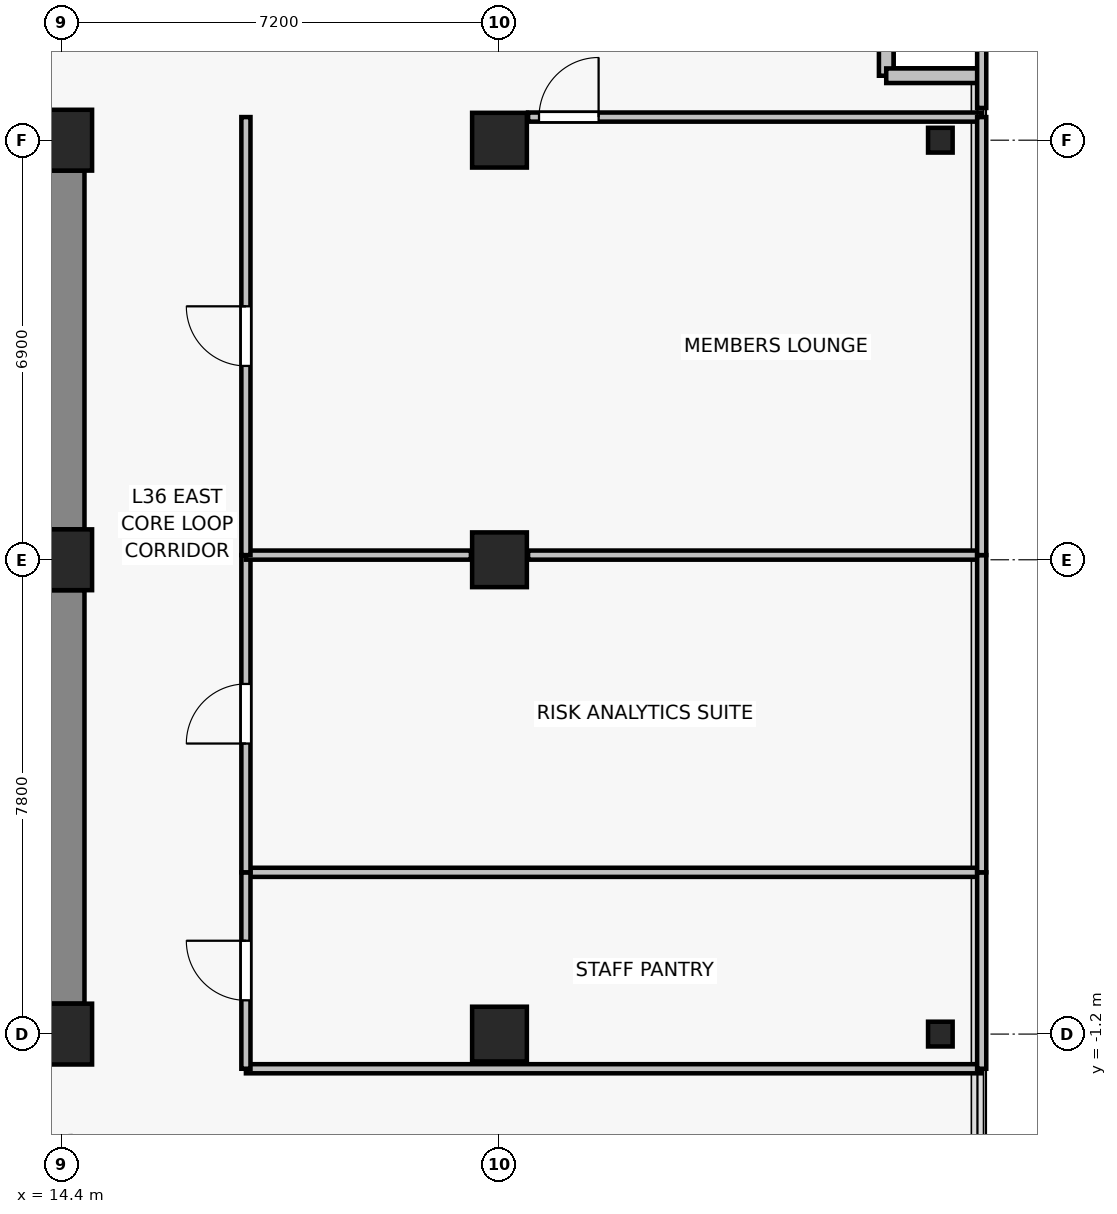
"""IFC4 building model, lengths in metres.
Left out: names, types, materials, properties, quantities, classifications, styles, units other than length and angle.
Written with IfcOpenShell. Run it as: python <this file> out.ifc"""

import sys

from ifc_helpers import new_model, si_unit, direction, frame, frame_2d, origin, origin_2d, place, context, subcontext, project, spatial, rectangle, i_section, extrude, source, transform, mapped, element, fill, save


model = new_model("IFC4")
c1 = context("Model", 3, precision=1e-05, world=origin(), true_north=direction((0.0, 1.0)))
c2 = subcontext(c1, "Body", "Model", "MODEL_VIEW")
j1 = project(units=[si_unit("LENGTHUNIT", "METRE"), si_unit("PLANEANGLEUNIT", "RADIAN")], contexts=[c1])
p1 = place(None, origin())
s1 = spatial("IfcSite", under=j1, at=p1, CompositionType="ELEMENT")
p2 = place(p1, origin())
s2 = spatial("IfcBuilding", under=s1, at=p2, CompositionType="ELEMENT")
p3 = place(p2, frame((0.0, 0.0, 129.7)))
s3 = spatial("IfcBuildingStorey", under=s2, at=p3, CompositionType="ELEMENT", Elevation=129.7)
for number, where, z_axis, x_axis in (
    (1, (14.4, -1.2, 0.0), (0.0, 0.0, 1.0), (1.0, 0.0, 0.0)),
    (2, (14.4, 6.6, 0.0), (0.0, 0.0, 1.0), (1.0, 0.0, 0.0)),
    (3, (14.4, 13.5, 0.0), (0.0, 0.0, 1.0), (1.0, 0.0, 0.0)),
):
    element("IfcColumn", number, at=place(p3, frame(where, z_axis=z_axis, x_axis=x_axis)), inside=s3, PredefinedType="COLUMN", context=c2, shape_type="SweptSolid", body=[
        extrude(rectangle(XDim=1.0, YDim=1.0, at=origin_2d()), origin(), (0.0, 0.0, 1.0), 3.3),
    ])
for number, where, z_axis, x_axis in (
    (4, (21.6, -1.2, 0.0), (0.0, 0.0, 1.0), (1.0, 0.0, 0.0)),
    (5, (21.6, 6.6, 0.0), (0.0, 0.0, 1.0), (1.0, 0.0, 0.0)),
    (6, (21.6, 13.5, 0.0), (0.0, 0.0, 1.0), (1.0, 0.0, 0.0)),
):
    element("IfcColumn", number, at=place(p3, frame(where, z_axis=z_axis, x_axis=x_axis)), inside=s3, PredefinedType="COLUMN", context=c2, shape_type="SweptSolid", body=[
        extrude(rectangle(XDim=0.9, YDim=0.9, at=origin_2d()), origin(), (0.0, 0.0, 1.0), 3.3),
    ])
for number, where, z_axis, x_axis in (
    (7, (28.85, -1.2, 0.0), (0.0, 0.0, 1.0), (1.0, 0.0, 0.0)),
    (8, (28.85, 13.5, 0.0), (0.0, 0.0, 1.0), (1.0, 0.0, 0.0)),
):
    element("IfcColumn", number, at=place(p3, frame(where, z_axis=z_axis, x_axis=x_axis)), inside=s3, PredefinedType="COLUMN", context=c2, shape_type="SweptSolid", body=[
        extrude(i_section(OverallWidth=0.404, OverallDepth=0.407, WebThickness=0.022, FlangeThickness=0.032, FilletRadius=0.015, at=origin_2d()), origin(), (0.0, 0.0, 1.0), 3.3),
    ])
p4 = place(p3, frame((14.4, -0.7, 0.0), z_axis=(0.0, 0.0, 1.0), x_axis=(0.0, 1.0, 0.0)))
e9 = element("IfcWall", 9, at=p4, inside=s3, PredefinedType="SHEAR", context=c2, shape_type="SweptSolid", body=[
    extrude(rectangle(XDim=6.8, YDim=0.75, at=frame_2d((3.4, 0.0))), origin(), (0.0, 0.0, 1.0), 3.075),
])
p5 = place(p3, frame((14.4, 7.1, 0.0), z_axis=(0.0, 0.0, 1.0), x_axis=(0.0, 1.0, 0.0)))
e10 = element("IfcWall", 10, at=p5, inside=s3, PredefinedType="SHEAR", context=c2, shape_type="SweptSolid", body=[
    extrude(rectangle(XDim=5.9, YDim=0.75, at=frame_2d((2.95, 0.0))), origin(), (0.0, 0.0, 1.0), 3.075),
])
for number, where, z_axis, x_axis in (
    (11, (27.96, 14.56, 0.0), (0.0, 0.0, 1.0), (0.0, 1.0, 0.0)),
    (12, (29.46, 14.56, 0.0), (0.0, 0.0, 1.0), (-1.0, 0.0, 0.0)),
):
    element("IfcWall", number, at=place(p3, frame(where, z_axis=z_axis, x_axis=x_axis)), inside=s3, PredefinedType="SOLIDWALL", context=c2, shape_type="SweptSolid", body=[
        extrude(rectangle(XDim=1.5, YDim=0.24, at=frame_2d((0.75, 0.0))), origin(), (0.0, 0.0, 1.0), 3.075),
    ])
for number, where, z_axis, x_axis in (
    (13, (29.53, -1.77, 0.0), (0.0, 0.0, 1.0), (-1.0, 0.0, 0.0)),
    (14, (17.43, 1.46, 0.0), (0.0, 0.0, 1.0), (1.0, 0.0, 0.0)),
):
    element("IfcWall", number, at=place(p3, frame(where, z_axis=z_axis, x_axis=x_axis)), inside=s3, PredefinedType="PARTITIONING", context=c2, shape_type="SweptSolid", body=[
        extrude(rectangle(XDim=12.1, YDim=0.15, at=frame_2d((6.05, 0.0))), origin(), (0.0, 0.0, 1.0), 2.515),
    ])
p6 = place(p3, frame((17.43, -1.77, 0.0), z_axis=(0.0, 0.0, 1.0), x_axis=(0.0, 1.0, 0.0)))
e15 = element("IfcWall", 15, at=p6, inside=s3, PredefinedType="PARTITIONING", context=c2, shape_type="SweptSolid", body=[
    extrude(rectangle(XDim=3.23, YDim=0.15, at=frame_2d((1.615, 0.0))), origin(), (0.0, 0.0, 1.0), 2.515),
])
p7 = place(p6, frame((1.125, 0.0, 0.0)))
e16 = element("IfcOpeningElement", 16, at=p7, cuts=e15, PredefinedType="OPENING", context=c2, shape_type="SweptSolid", body=[
    extrude(rectangle(XDim=0.98, YDim=2.15, at=frame_2d((0.49, 1.075))), frame((0.0, 0.085, 0.0), z_axis=(0.0, -1.0, 0.0), x_axis=(1.0, 0.0, 0.0)), (0.0, 0.0, 1.0), 0.17),
])
p8 = place(p3, frame((29.53, 1.46, 0.0), z_axis=(0.0, 0.0, 1.0), x_axis=(0.0, -1.0, 0.0)))
e17 = element("IfcWall", 17, at=p8, inside=s3, PredefinedType="PARTITIONING", context=c2, shape_type="SweptSolid", body=[
    extrude(rectangle(XDim=3.23, YDim=0.15, at=frame_2d((1.615, 0.0))), origin(), (0.0, 0.0, 1.0), 3.075),
])
p9 = place(p3, frame((22.07, 6.677, 0.0), z_axis=(0.0, 0.0, 1.0), x_axis=(1.0, 0.0, 0.0)))
e18 = element("IfcWall", 18, at=p9, inside=s3, PredefinedType="PARTITIONING", context=c2, shape_type="SweptSolid", body=[
    extrude(rectangle(XDim=7.46, YDim=0.15, at=frame_2d((3.73, 0.0))), origin(), (0.0, 0.0, 1.0), 2.565),
])
p10 = place(p3, frame((17.43, 1.46, 0.0), z_axis=(0.0, 0.0, 1.0), x_axis=(0.0, 1.0, 0.0)))
e19 = element("IfcWall", 19, at=p10, inside=s3, PredefinedType="PARTITIONING", context=c2, shape_type="SweptSolid", body=[
    extrude(rectangle(XDim=5.217, YDim=0.15, at=frame_2d((2.608, 0.0))), origin(), (0.0, 0.0, 1.0), 2.515),
])
p11 = place(p10, frame((2.118, 0.0, 0.0)))
e20 = element("IfcOpeningElement", 20, at=p11, cuts=e19, PredefinedType="OPENING", context=c2, shape_type="SweptSolid", body=[
    extrude(rectangle(XDim=0.98, YDim=2.15, at=frame_2d((0.49, 1.075))), frame((0.0, 0.085, 0.0), z_axis=(0.0, -1.0, 0.0), x_axis=(1.0, 0.0, 0.0)), (0.0, 0.0, 1.0), 0.17),
])
p12 = place(p3, frame((29.53, 6.677, 0.0), z_axis=(0.0, 0.0, 1.0), x_axis=(0.0, -1.0, 0.0)))
e21 = element("IfcWall", 21, at=p12, inside=s3, PredefinedType="PARTITIONING", context=c2, shape_type="SweptSolid", body=[
    extrude(rectangle(XDim=5.217, YDim=0.15, at=frame_2d((2.608, 0.0))), origin(), (0.0, 0.0, 1.0), 3.075),
])
p13 = place(p3, frame((21.13, 6.677, 0.0), z_axis=(0.0, 0.0, 1.0), x_axis=(-1.0, 0.0, 0.0)))
e22 = element("IfcWall", 22, at=p13, inside=s3, PredefinedType="PARTITIONING", context=c2, shape_type="SweptSolid", body=[
    extrude(rectangle(XDim=3.7, YDim=0.15, at=frame_2d((1.85, 0.0))), origin(), (0.0, 0.0, 1.0), 2.515),
])
p14 = place(p3, frame((22.07, 13.88, 0.0), z_axis=(0.0, 0.0, 1.0), x_axis=(1.0, 0.0, 0.0)))
e23 = element("IfcWall", 23, at=p14, inside=s3, PredefinedType="PARTITIONING", context=c2, shape_type="SweptSolid", body=[
    extrude(rectangle(XDim=7.46, YDim=0.15, at=frame_2d((3.73, 0.0))), origin(), (0.0, 0.0, 1.0), 3.075),
])
p15 = place(p14, frame((0.18, 0.0, 0.0)))
e24 = element("IfcOpeningElement", 24, at=p15, cuts=e23, PredefinedType="OPENING", context=c2, shape_type="SweptSolid", body=[
    extrude(rectangle(XDim=0.98, YDim=2.15, at=frame_2d((0.49, 1.075))), frame((0.0, 0.085, 0.0), z_axis=(0.0, -1.0, 0.0), x_axis=(1.0, 0.0, 0.0)), (0.0, 0.0, 1.0), 0.17),
])
p16 = place(p3, frame((17.43, 6.677, 0.0), z_axis=(0.0, 0.0, 1.0), x_axis=(0.0, 1.0, 0.0)))
e25 = element("IfcWall", 25, at=p16, inside=s3, PredefinedType="PARTITIONING", context=c2, shape_type="SweptSolid", body=[
    extrude(rectangle(XDim=7.203, YDim=0.15, at=frame_2d((3.602, 0.0))), origin(), (0.0, 0.0, 1.0), 2.515),
])
p17 = place(p16, frame((3.111, 0.0, 0.0)))
e26 = element("IfcOpeningElement", 26, at=p17, cuts=e25, PredefinedType="OPENING", context=c2, shape_type="SweptSolid", body=[
    extrude(rectangle(XDim=0.98, YDim=2.15, at=frame_2d((0.49, 1.075))), frame((0.0, 0.085, 0.0), z_axis=(0.0, -1.0, 0.0), x_axis=(1.0, 0.0, 0.0)), (0.0, 0.0, 1.0), 0.17),
])
p18 = place(p3, frame((29.53, 13.88, 0.0), z_axis=(0.0, 0.0, 1.0), x_axis=(0.0, -1.0, 0.0)))
e27 = element("IfcWall", 27, at=p18, inside=s3, PredefinedType="PARTITIONING", context=c2, shape_type="SweptSolid", body=[
    extrude(rectangle(XDim=7.203, YDim=0.15, at=frame_2d((3.602, 0.0))), origin(), (0.0, 0.0, 1.0), 3.075),
])
p19 = place(p3, frame((29.53, 17.63, 0.0), z_axis=(0.0, 0.0, 1.0), x_axis=(0.0, -1.0, 0.0)))
e28 = element("IfcWall", 28, at=p19, inside=s3, PredefinedType="PARTITIONING", context=c2, shape_type="SweptSolid", body=[
    extrude(rectangle(XDim=3.6, YDim=0.15, at=frame_2d((1.8, 0.0))), origin(), (0.0, 0.0, 1.0), 3.075),
])
m1 = source(origin(), c2, "Body", "SweptSolid", [
    extrude(rectangle(XDim=0.98, YDim=2.15, at=frame_2d((0.49, 1.075))), frame((0.0, 0.025, 0.0), z_axis=(0.0, -1.0, 0.0), x_axis=(1.0, 0.0, 0.0)), (0.0, 0.0, 1.0), 0.05),
])
p20 = place(p7, origin())
e29 = element("IfcDoor", 29, at=p20, inside=s3, OperationType="SINGLE_SWING_RIGHT", PredefinedType="DOOR", context=c2, shape_type="MappedRepresentation", body=[
    mapped(m1, transform((0.0, 0.0, 0.0), x_axis=(1.0, 0.0, 0.0), y_axis=(0.0, 1.0, 0.0), z_axis=(0.0, 0.0, 1.0), scale=1.0)),
])
fill(e16, e29)
p21 = place(p11, origin())
e30 = element("IfcDoor", 30, at=p21, inside=s3, OperationType="SINGLE_SWING_LEFT", PredefinedType="DOOR", context=c2, shape_type="MappedRepresentation", body=[
    mapped(m1, transform((0.0, 0.0, 0.0), x_axis=(1.0, 0.0, 0.0), y_axis=(0.0, 1.0, 0.0), z_axis=(0.0, 0.0, 1.0), scale=1.0)),
])
fill(e20, e30)
p22 = place(p17, origin())
e31 = element("IfcDoor", 31, at=p22, inside=s3, OperationType="SINGLE_SWING_RIGHT", PredefinedType="DOOR", context=c2, shape_type="MappedRepresentation", body=[
    mapped(m1, transform((0.0, 0.0, 0.0), x_axis=(1.0, 0.0, 0.0), y_axis=(0.0, 1.0, 0.0), z_axis=(0.0, 0.0, 1.0), scale=1.0)),
])
fill(e26, e31)
p23 = place(p15, origin())
e32 = element("IfcDoor", 32, at=p23, inside=s3, OperationType="SINGLE_SWING_RIGHT", PredefinedType="DOOR", context=c2, shape_type="MappedRepresentation", body=[
    mapped(m1, transform((0.0, 0.0, 0.0), x_axis=(1.0, 0.0, 0.0), y_axis=(0.0, 1.0, 0.0), z_axis=(0.0, 0.0, 1.0), scale=1.0)),
])
fill(e24, e32)
save(model, sys.argv[1])
